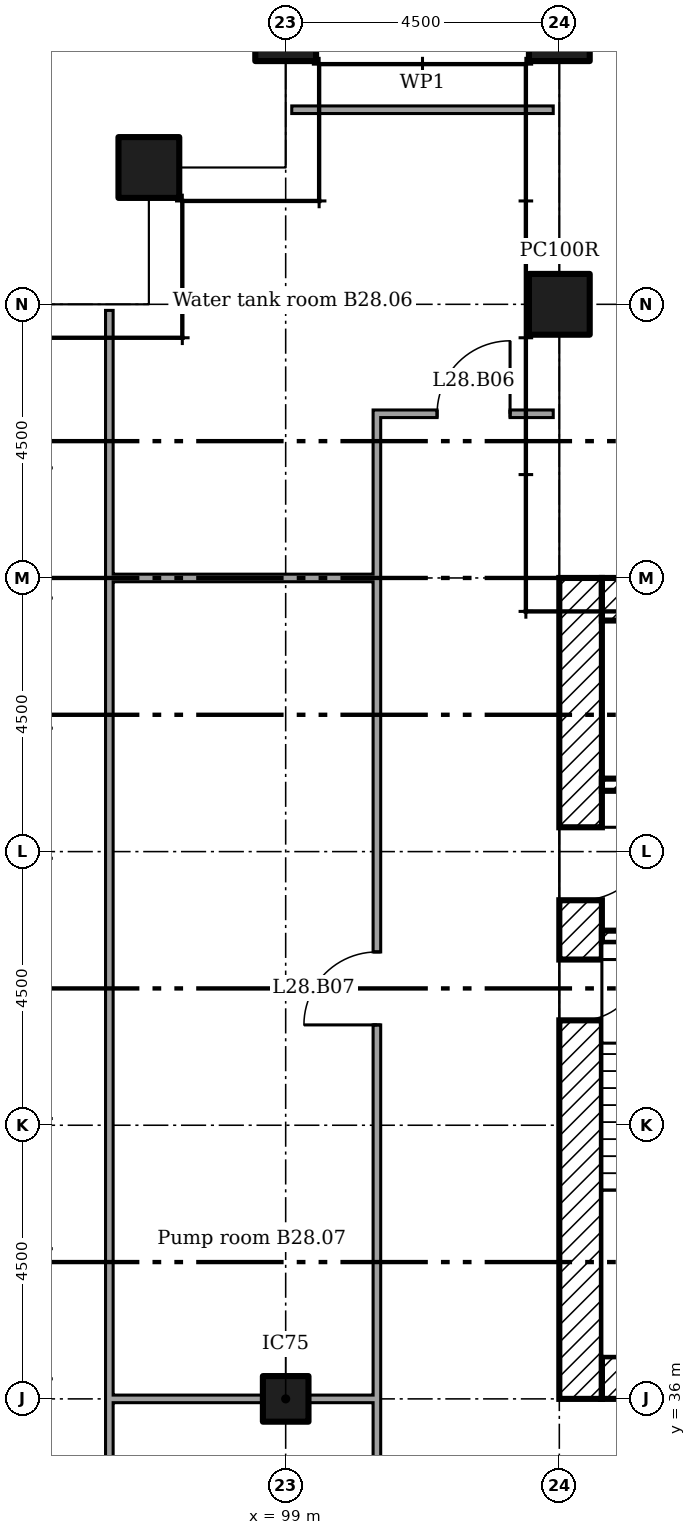
"""IFC4 building model, lengths in metres.
Left out: names, types, materials, properties, quantities, classifications, styles, units other than length and angle.
Written with IfcOpenShell. Run it as: python <this file> out.ifc"""

import sys

from ifc_helpers import new_model, si_unit, direction, frame, frame_2d, origin, origin_2d, place, context, subcontext, project, spatial, rectangle, extrude, element, fill, save


model = new_model("IFC4")
c1 = context("Model", 3, precision=1e-05, world=origin(), true_north=direction((0.0, 1.0)))
c2 = subcontext(c1, "Body", "Model", "MODEL_VIEW")
j1 = project(units=[si_unit("LENGTHUNIT", "METRE"), si_unit("PLANEANGLEUNIT", "RADIAN")], contexts=[c1])
p1 = place(None, origin())
s1 = spatial("IfcSite", under=j1, at=p1, CompositionType="ELEMENT")
p2 = place(p1, origin())
s2 = spatial("IfcBuilding", under=s1, at=p2, CompositionType="ELEMENT")
p3 = place(p2, frame((0.0, 0.0, 113.6)))
s3 = spatial("IfcBuildingStorey", under=s2, at=p3, CompositionType="ELEMENT", Elevation=113.6)
for number, where in (
    (1, (103.5, 54.0, 0.0)),
    (2, (103.5, 58.5, 0.0)),
    (3, (99.0, 58.5, 0.0)),
    (4, (96.75, 56.25, 0.0)),
):
    element("IfcColumn", number, at=place(p3, frame(where)), inside=s3, PredefinedType="COLUMN", context=c2, shape_type="SweptSolid", body=[
        extrude(rectangle(XDim=1.0, YDim=1.0, at=origin_2d()), origin(), (0.0, 0.0, 1.0), 7.2),
    ])
p4 = place(p3, frame((99.0, 36.0, 0.0)))
e5 = element("IfcColumn", 5, at=p4, inside=s3, PredefinedType="COLUMN", context=c2, shape_type="SweptSolid", body=[
    extrude(rectangle(XDim=0.75, YDim=0.75, at=origin_2d()), origin(), (0.0, 0.0, 1.0), 7.2),
])
for number, where in (
    (6, (104.2, 49.15, 0.0)),
    (7, (104.2, 36.35, 0.0)),
):
    element("IfcWall", number, at=place(p3, frame(where)), inside=s3, PredefinedType="SHEAR", context=c2, shape_type="SweptSolid", body=[
        extrude(rectangle(XDim=12.1, YDim=0.7, at=frame_2d((6.05, 0.0))), origin(), (0.0, 0.0, 1.0), 6.95),
    ])
p5 = place(p3, frame((103.85, 36.0, 0.0), z_axis=(0.0, 0.0, 1.0), x_axis=(0.0, 1.0, 0.0)))
e8 = element("IfcWall", 8, at=p5, inside=s3, PredefinedType="SHEAR", context=c2, shape_type="SweptSolid", body=[
    extrude(rectangle(XDim=13.5, YDim=0.7, at=frame_2d((6.75, 0.0))), origin(), (0.0, 0.0, 1.0), 6.95),
])
p6 = place(p5, frame((8.2, 0.0, 0.0)))
e9 = element("IfcOpeningElement", 9, at=p6, cuts=e8, PredefinedType="OPENING", context=c2, shape_type="SweptSolid", body=[
    extrude(rectangle(XDim=1.2, YDim=2.1, at=frame_2d((0.6, 1.05))), frame((0.0, 0.36, 0.0), z_axis=(0.0, -1.0, 0.0), x_axis=(1.0, 0.0, 0.0)), (0.0, 0.0, 1.0), 0.72),
])
p7 = place(p5, frame((6.225, 0.0, 0.0)))
e10 = element("IfcOpeningElement", 10, at=p7, cuts=e8, PredefinedType="OPENING", context=c2, shape_type="SweptSolid", body=[
    extrude(rectangle(XDim=1.0, YDim=2.1, at=frame_2d((0.5, 1.05))), frame((0.0, 0.36, 0.0), z_axis=(0.0, -1.0, 0.0), x_axis=(1.0, 0.0, 0.0)), (0.0, 0.0, 1.0), 0.72),
])
p8 = place(p3, frame((104.2, 46.1, 0.0)))
e11 = element("IfcWall", 11, at=p8, inside=s3, PredefinedType="SHEAR", context=c2, shape_type="SweptSolid", body=[
    extrude(rectangle(XDim=3.133, YDim=0.2, at=frame_2d((1.567, 0.0))), origin(), (0.0, 0.0, 1.0), 6.95),
])
p9 = place(p8, frame((1.317, 0.0, 0.0)))
e12 = element("IfcOpeningElement", 12, at=p9, cuts=e11, PredefinedType="OPENING", context=c2, shape_type="SweptSolid", body=[
    extrude(rectangle(XDim=0.9, YDim=2.1, at=frame_2d((0.45, 1.05))), frame((0.0, 0.11, 0.0), z_axis=(0.0, -1.0, 0.0), x_axis=(1.0, 0.0, 0.0)), (0.0, 0.0, 1.0), 0.22),
])
p10 = place(p3, frame((104.2, 43.6, 0.0)))
e13 = element("IfcWall", 13, at=p10, inside=s3, PredefinedType="SHEAR", context=c2, shape_type="SweptSolid", body=[
    extrude(rectangle(XDim=2.8, YDim=0.2, at=frame_2d((1.4, 0.0))), origin(), (0.0, 0.0, 1.0), 6.95),
])
p11 = place(p10, frame((1.05, 0.0, 0.0)))
e14 = element("IfcOpeningElement", 14, at=p11, cuts=e13, PredefinedType="OPENING", context=c2, shape_type="SweptSolid", body=[
    extrude(rectangle(XDim=1.0, YDim=2.1, at=frame_2d((0.5, 1.05))), frame((0.0, 0.11, 0.0), z_axis=(0.0, -1.0, 0.0), x_axis=(1.0, 0.0, 0.0)), (0.0, 0.0, 1.0), 0.22),
])
p12 = place(p3, frame((96.1, 36.0, 0.0)))
e15 = element("IfcWall", 15, at=p12, inside=s3, PredefinedType="PARTITIONING", context=c2, shape_type="SweptSolid", body=[
    extrude(rectangle(XDim=2.525, YDim=0.125, at=frame_2d((1.262, 0.0))), origin(), (0.0, 0.0, 1.0), 6.442),
])
p13 = place(p3, frame((99.375, 36.0, 0.0)))
e16 = element("IfcWall", 16, at=p13, inside=s3, PredefinedType="PARTITIONING", context=c2, shape_type="SweptSolid", body=[
    extrude(rectangle(XDim=1.125, YDim=0.125, at=frame_2d((0.562, 0.0))), origin(), (0.0, 0.0, 1.0), 6.442),
])
p14 = place(p3, frame((96.1, 49.5, 0.0)))
e17 = element("IfcWall", 17, at=p14, inside=s3, PredefinedType="PARTITIONING", context=c2, shape_type="SweptSolid", body=[
    extrude(rectangle(XDim=4.4, YDim=0.125, at=frame_2d((2.2, 0.0))), origin(), (0.0, 0.0, 1.0), 6.451),
])
p15 = place(p3, frame((100.438, 52.2, 0.0)))
e18 = element("IfcWall", 18, at=p15, inside=s3, PredefinedType="PARTITIONING", context=c2, shape_type="SweptSolid", body=[
    extrude(rectangle(XDim=2.962, YDim=0.125, at=frame_2d((1.481, 0.0))), origin(), (0.0, 0.0, 1.0), 7.05),
])
p16 = place(p15, frame((1.052, 0.0, 0.0)))
e19 = element("IfcOpeningElement", 19, at=p16, cuts=e18, PredefinedType="OPENING", context=c2, shape_type="SweptSolid", body=[
    extrude(rectangle(XDim=1.2, YDim=2.1, at=frame_2d((0.6, 1.05))), frame((0.0, 0.073, 0.0), z_axis=(0.0, -1.0, 0.0), x_axis=(1.0, 0.0, 0.0)), (0.0, 0.0, 1.0), 0.145),
])
p17 = place(p3, frame((99.1, 57.2, 0.0)))
e20 = element("IfcWall", 20, at=p17, inside=s3, PredefinedType="PARTITIONING", context=c2, shape_type="SweptSolid", body=[
    extrude(rectangle(XDim=4.3, YDim=0.125, at=frame_2d((2.15, 0.0))), origin(), (0.0, 0.0, 1.0), 7.05),
])
p18 = place(p3, frame((96.1, 31.6, 0.0), z_axis=(0.0, 0.0, 1.0), x_axis=(0.0, 1.0, 0.0)))
e21 = element("IfcWall", 21, at=p18, inside=s3, PredefinedType="PARTITIONING", context=c2, shape_type="SweptSolid", body=[
    extrude(rectangle(XDim=22.3, YDim=0.125, at=frame_2d((11.15, 0.0))), origin(), (0.0, 0.0, 1.0), 7.05),
])
p19 = place(p3, frame((100.5, 33.663, 0.0), z_axis=(0.0, 0.0, 1.0), x_axis=(0.0, 1.0, 0.0)))
e22 = element("IfcWall", 22, at=p19, inside=s3, PredefinedType="PARTITIONING", context=c2, shape_type="SweptSolid", body=[
    extrude(rectangle(XDim=18.475, YDim=0.125, at=frame_2d((9.237, 0.0))), origin(), (0.0, 0.0, 1.0), 7.05),
])
p20 = place(p19, frame((8.488, 0.0, 0.0)))
e23 = element("IfcOpeningElement", 23, at=p20, cuts=e22, PredefinedType="OPENING", context=c2, shape_type="SweptSolid", body=[
    extrude(rectangle(XDim=1.2, YDim=2.1, at=frame_2d((0.6, 1.05))), frame((0.0, 0.073, 0.0), z_axis=(0.0, -1.0, 0.0), x_axis=(1.0, 0.0, 0.0)), (0.0, 0.0, 1.0), 0.145),
])
p21 = place(p6, frame((1.2, 0.0, 0.0), x_axis=(-1.0, 0.0, 0.0)))
e24 = element("IfcDoor", 24, at=p21, inside=s3, OperationType="SINGLE_SWING_RIGHT", PredefinedType="DOOR", context=c2, shape_type="SweptSolid", body=[
    extrude(rectangle(XDim=1.2, YDim=2.1, at=frame_2d((0.6, 1.05))), frame((0.0, 0.025, 0.0), z_axis=(0.0, -1.0, 0.0), x_axis=(1.0, 0.0, 0.0)), (0.0, 0.0, 1.0), 0.05),
])
fill(e9, e24)
p22 = place(p7, frame((1.0, 0.0, 0.0), x_axis=(-1.0, 0.0, 0.0)))
e25 = element("IfcDoor", 25, at=p22, inside=s3, OperationType="SINGLE_SWING_RIGHT", PredefinedType="DOOR", context=c2, shape_type="SweptSolid", body=[
    extrude(rectangle(XDim=1.0, YDim=2.1, at=frame_2d((0.5, 1.05))), frame((0.0, 0.025, 0.0), z_axis=(0.0, -1.0, 0.0), x_axis=(1.0, 0.0, 0.0)), (0.0, 0.0, 1.0), 0.05),
])
fill(e10, e25)
p23 = place(p16, origin())
e26 = element("IfcDoor", 26, at=p23, inside=s3, OperationType="SINGLE_SWING_LEFT", PredefinedType="DOOR", context=c2, shape_type="SweptSolid", body=[
    extrude(rectangle(XDim=1.2, YDim=2.1, at=frame_2d((0.6, 1.05))), frame((0.0, 0.025, 0.0), z_axis=(0.0, -1.0, 0.0), x_axis=(1.0, 0.0, 0.0)), (0.0, 0.0, 1.0), 0.05),
])
fill(e19, e26)
p24 = place(p20, origin())
e27 = element("IfcDoor", 27, at=p24, inside=s3, OperationType="SINGLE_SWING_RIGHT", PredefinedType="DOOR", context=c2, shape_type="SweptSolid", body=[
    extrude(rectangle(XDim=1.2, YDim=2.1, at=frame_2d((0.6, 1.05))), frame((0.0, 0.025, 0.0), z_axis=(0.0, -1.0, 0.0), x_axis=(1.0, 0.0, 0.0)), (0.0, 0.0, 1.0), 0.05),
])
fill(e23, e27)
save(model, sys.argv[1])
